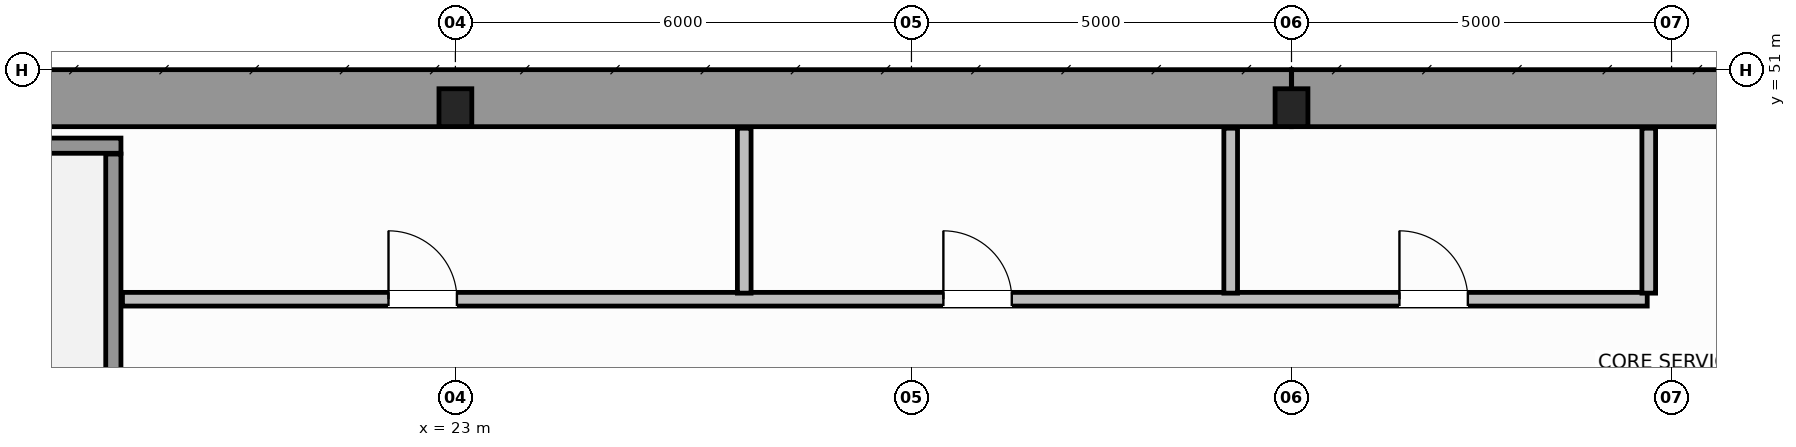
"""IFC4 building model, lengths in metres.
Left out: names, types, materials, properties, quantities, classifications, styles, units other than length and angle.
Written with IfcOpenShell. Run it as: python <this file> out.ifc"""

import sys

from ifc_helpers import new_model, si_unit, direction, frame, frame_2d, origin, origin_2d, place, context, subcontext, project, spatial, rectangle, i_section, extrude, source, transform, mapped, element, fill, save


model = new_model("IFC4")
c1 = context("Model", 3, precision=1e-05, world=origin(), true_north=direction((0.0, 1.0)))
c2 = subcontext(c1, "Body", "Model", "MODEL_VIEW")
j1 = project(units=[si_unit("LENGTHUNIT", "METRE"), si_unit("PLANEANGLEUNIT", "RADIAN")], contexts=[c1])
p1 = place(None, origin())
s1 = spatial("IfcSite", under=j1, at=p1, CompositionType="ELEMENT")
p2 = place(p1, origin())
s2 = spatial("IfcBuilding", under=s1, at=p2, CompositionType="ELEMENT")
p3 = place(p2, frame((0.0, 0.0, 149.0)))
s3 = spatial("IfcBuildingStorey", under=s2, at=p3, CompositionType="ELEMENT", Elevation=149.0)
m1 = source(origin(), c2, "Body", "SweptSolid", [
    extrude(i_section(OverallWidth=0.432, OverallDepth=0.498, WebThickness=0.055, FlangeThickness=0.068, FilletRadius=0.015, at=origin_2d()), origin(), (0.0, 0.0, 1.0), 4.8),
])
for number, where, z_axis, x_axis in (
    (1, (23.0, 50.5, 0.0), (0.0, 0.0, 1.0), (1.0, 0.0, 0.0)),
    (2, (34.0, 50.5, 0.0), (0.0, 0.0, 1.0), (1.0, 0.0, 0.0)),
):
    element("IfcColumn", number, at=place(p3, frame(where, z_axis=z_axis, x_axis=x_axis)), inside=s3, PredefinedType="COLUMN", context=c2, shape_type="MappedRepresentation", body=[
        mapped(m1, transform((0.0, 0.0, 0.0), scale=1.0)),
    ])
for number, where, z_axis, x_axis in (
    (3, (14.379, 50.625, 0.0), (0.0, 0.0, 1.0), (1.0, 0.0, 0.0)),
    (4, (34.002, 50.625, 0.0), (0.0, 0.0, 1.0), (1.0, 0.0, 0.0)),
):
    element("IfcWall", number, at=place(p3, frame(where, z_axis=z_axis, x_axis=x_axis)), inside=s3, PredefinedType="SHEAR", context=c2, shape_type="SweptSolid", body=[
        extrude(rectangle(XDim=19.619, YDim=0.75, at=frame_2d((9.81, 0.0))), origin(), (0.0, 0.0, 1.0), 4.8),
    ])
p4 = place(p3, frame((14.375, 50.0, 0.0), z_axis=(0.0, 0.0, 1.0), x_axis=(1.0, 0.0, 0.0)))
e5 = element("IfcWall", 5, at=p4, inside=s3, PredefinedType="SOLIDWALL", context=c2, shape_type="SweptSolid", body=[
    extrude(rectangle(XDim=4.225, YDim=0.2, at=frame_2d((2.113, 0.0))), origin(), (0.0, 0.0, 1.0), 4.8),
])
p5 = place(p3, frame((18.5, 39.96, 0.0), z_axis=(0.0, 0.0, 1.0), x_axis=(0.0, 1.0, 0.0)))
e6 = element("IfcWall", 6, at=p5, inside=s3, PredefinedType="SOLIDWALL", context=c2, shape_type="SweptSolid", body=[
    extrude(rectangle(XDim=9.93, YDim=0.2, at=frame_2d((4.965, 0.0))), origin(), (0.0, 0.0, 1.0), 4.8),
])
p6 = place(p3, frame((18.62, 47.98, 0.0), z_axis=(0.0, 0.0, 1.0), x_axis=(1.0, 0.0, 0.0)))
e7 = element("IfcWall", 7, at=p6, inside=s3, PredefinedType="PLUMBINGWALL", context=c2, shape_type="SweptSolid", body=[
    extrude(rectangle(XDim=20.06, YDim=0.18, at=frame_2d((10.03, 0.0))), origin(), (0.0, 0.0, 1.0), 4.54),
])
p7 = place(p6, frame((3.5, 0.0, 0.0)))
e8 = element("IfcOpeningElement", 8, at=p7, cuts=e7, PredefinedType="OPENING", context=c2, shape_type="SweptSolid", body=[
    extrude(rectangle(XDim=0.9, YDim=2.15, at=frame_2d((0.45, 1.075))), frame((0.0, 0.1, 0.0), z_axis=(0.0, -1.0, 0.0), x_axis=(1.0, 0.0, 0.0)), (0.0, 0.0, 1.0), 0.2),
])
p8 = place(p6, frame((10.8, 0.0, 0.0)))
e9 = element("IfcOpeningElement", 9, at=p8, cuts=e7, PredefinedType="OPENING", context=c2, shape_type="SweptSolid", body=[
    extrude(rectangle(XDim=0.9, YDim=2.15, at=frame_2d((0.45, 1.075))), frame((0.0, 0.1, 0.0), z_axis=(0.0, -1.0, 0.0), x_axis=(1.0, 0.0, 0.0)), (0.0, 0.0, 1.0), 0.2),
])
p9 = place(p6, frame((16.8, 0.0, 0.0)))
e10 = element("IfcOpeningElement", 10, at=p9, cuts=e7, PredefinedType="OPENING", context=c2, shape_type="SweptSolid", body=[
    extrude(rectangle(XDim=0.9, YDim=2.15, at=frame_2d((0.45, 1.075))), frame((0.0, 0.1, 0.0), z_axis=(0.0, -1.0, 0.0), x_axis=(1.0, 0.0, 0.0)), (0.0, 0.0, 1.0), 0.2),
])
for number, where, z_axis, x_axis in (
    (11, (26.8, 48.06, 0.0), (0.0, 0.0, 1.0), (0.0, 1.0, 0.0)),
    (12, (33.2, 48.06, 0.0), (0.0, 0.0, 1.0), (0.0, 1.0, 0.0)),
    (13, (38.7, 48.06, 0.0), (0.0, 0.0, 1.0), (0.0, 1.0, 0.0)),
):
    element("IfcWall", number, at=place(p3, frame(where, z_axis=z_axis, x_axis=x_axis)), inside=s3, PredefinedType="PLUMBINGWALL", context=c2, shape_type="SweptSolid", body=[
        extrude(rectangle(XDim=2.17, YDim=0.18, at=frame_2d((1.085, 0.0))), origin(), (0.0, 0.0, 1.0), 4.54),
    ])
m2 = source(origin(), c2, "Body", "SweptSolid", [
    extrude(rectangle(XDim=0.9, YDim=2.15, at=frame_2d((0.45, 1.075))), frame((0.0, 0.025, 0.0), z_axis=(0.0, -1.0, 0.0), x_axis=(1.0, 0.0, 0.0)), (0.0, 0.0, 1.0), 0.05),
])
p10 = place(p7, origin())
e14 = element("IfcDoor", 14, at=p10, inside=s3, OperationType="SINGLE_SWING_LEFT", PredefinedType="DOOR", context=c2, shape_type="MappedRepresentation", body=[
    mapped(m2, transform((0.0, 0.0, 0.0), scale=1.0)),
])
fill(e8, e14)
p11 = place(p8, origin())
e15 = element("IfcDoor", 15, at=p11, inside=s3, OperationType="SINGLE_SWING_RIGHT", PredefinedType="DOOR", context=c2, shape_type="MappedRepresentation", body=[
    mapped(m2, transform((0.0, 0.0, 0.0), scale=1.0)),
])
fill(e9, e15)
p12 = place(p9, origin())
e16 = element("IfcDoor", 16, at=p12, inside=s3, OperationType="SINGLE_SWING_LEFT", PredefinedType="DOOR", context=c2, shape_type="MappedRepresentation", body=[
    mapped(m2, transform((0.0, 0.0, 0.0), scale=1.0)),
])
fill(e10, e16)
save(model, sys.argv[1])
